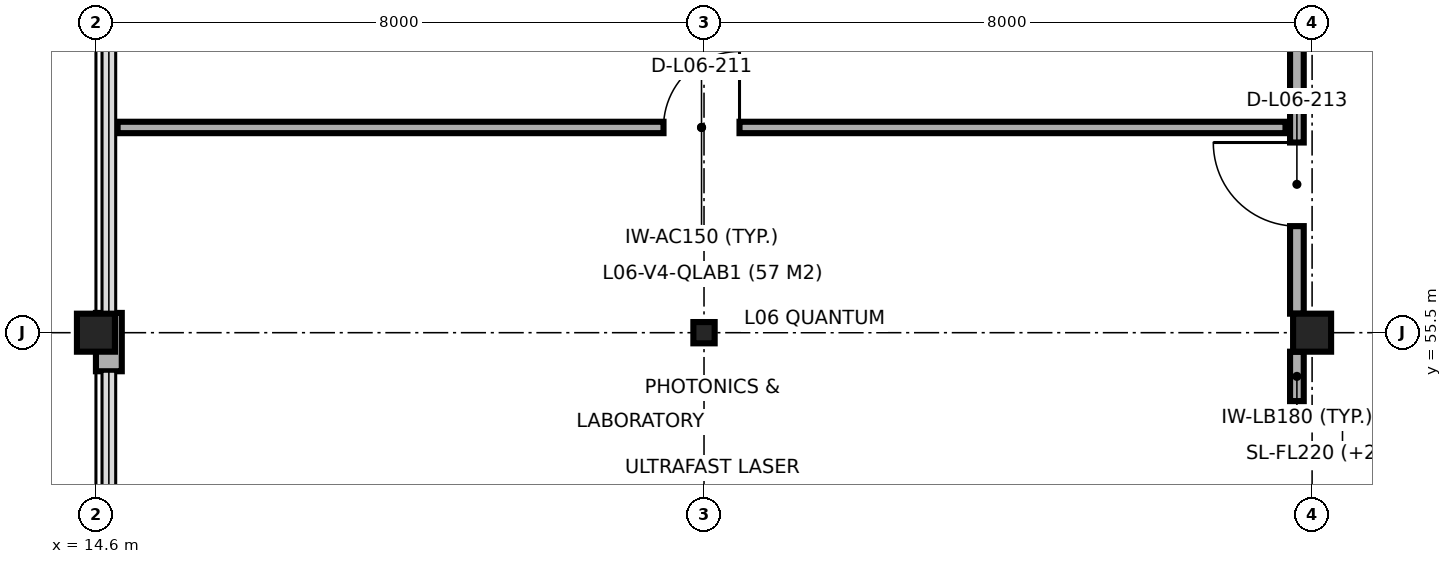
"""IFC4 building model, lengths in metres.
Left out: names, types, materials, properties, quantities, classifications, styles, units other than length and angle.
Written with IfcOpenShell. Run it as: python <this file> out.ifc"""

import sys

from ifc_helpers import new_model, si_unit, direction, frame, frame_2d, origin, origin_2d, place, context, subcontext, project, spatial, rectangle, i_section, extrude, element, fill, save


model = new_model("IFC4")
c1 = context("Model", 3, precision=1e-05, world=origin(), true_north=direction((0.0, 1.0)))
c2 = subcontext(c1, "Body", "Model", "MODEL_VIEW")
j1 = project(units=[si_unit("LENGTHUNIT", "METRE"), si_unit("PLANEANGLEUNIT", "RADIAN")], contexts=[c1])
p1 = place(None, origin())
s1 = spatial("IfcSite", under=j1, at=p1, CompositionType="ELEMENT")
p2 = place(p1, origin())
s2 = spatial("IfcBuilding", under=s1, at=p2, CompositionType="ELEMENT")
p3 = place(p2, frame((0.0, 0.0, 26.7)))
s3 = spatial("IfcBuildingStorey", under=s2, at=p3, CompositionType="ELEMENT", Elevation=26.7)
p4 = place(p3, frame((14.6, 55.5, 0.0), z_axis=(0.0, 0.0, 1.0), x_axis=(1.0, 0.0, 0.0)))
e1 = element("IfcColumn", 1, at=p4, inside=s3, PredefinedType="COLUMN", context=c2, shape_type="SweptSolid", body=[
    extrude(rectangle(XDim=0.5, YDim=0.5, at=origin_2d()), origin(), (0.0, 0.0, 1.0), 3.9),
])
p5 = place(p3, frame((22.6, 55.5, 0.0), z_axis=(0.0, 0.0, 1.0), x_axis=(1.0, 0.0, 0.0)))
e2 = element("IfcColumn", 2, at=p5, inside=s3, PredefinedType="COLUMN", context=c2, shape_type="SweptSolid", body=[
    extrude(i_section(OverallWidth=0.28, OverallDepth=0.28, WebThickness=0.01, FlangeThickness=0.018, FilletRadius=0.024, at=origin_2d()), origin(), (0.0, 0.0, 1.0), 3.9),
])
p6 = place(p3, frame((30.6, 55.5, 0.0), z_axis=(0.0, 0.0, 1.0), x_axis=(1.0, 0.0, 0.0)))
e3 = element("IfcColumn", 3, at=p6, inside=s3, PredefinedType="COLUMN", context=c2, shape_type="SweptSolid", body=[
    extrude(rectangle(XDim=0.5, YDim=0.5, at=origin_2d()), origin(), (0.0, 0.0, 1.0), 3.9),
])
p7 = place(p3, frame((14.77, 55.76, 0.0), z_axis=(0.0, 0.0, 1.0), x_axis=(0.0, -1.0, 0.0)))
e4 = element("IfcWall", 4, at=p7, inside=s3, PredefinedType="SOLIDWALL", context=c2, shape_type="SweptSolid", body=[
    extrude(rectangle(XDim=0.767, YDim=0.34, at=frame_2d((0.384, 0.0))), origin(), (0.0, 0.0, 1.0), 3.68),
])
p8 = place(p3, frame((14.885, 58.2, 0.0), z_axis=(0.0, 0.0, 1.0), x_axis=(1.0, 0.0, 0.0)))
e5 = element("IfcWall", 5, at=p8, inside=s3, PredefinedType="PARTITIONING", context=c2, shape_type="SweptSolid", body=[
    extrude(rectangle(XDim=15.365, YDim=0.15, at=frame_2d((7.683, 0.0))), origin(), (0.0, 0.0, 1.0), 3.68),
])
p9 = place(p8, frame((7.182, 0.0, 0.0)))
e6 = element("IfcOpeningElement", 6, at=p9, cuts=e5, PredefinedType="OPENING", context=c2, shape_type="SweptSolid", body=[
    extrude(rectangle(XDim=1.0, YDim=2.15, at=frame_2d((0.5, 1.075))), frame((0.0, 0.085, 0.0), z_axis=(0.0, -1.0, 0.0), x_axis=(1.0, 0.0, 0.0)), (0.0, 0.0, 1.0), 0.17),
])
p10 = place(p3, frame((30.4, 54.6, 0.0), z_axis=(0.0, 0.0, 1.0), x_axis=(0.0, 1.0, 0.0)))
e7 = element("IfcWall", 7, at=p10, inside=s3, PredefinedType="PARTITIONING", context=c2, shape_type="SweptSolid", body=[
    extrude(rectangle(XDim=0.65, YDim=0.18, at=frame_2d((0.325, 0.0))), origin(), (0.0, 0.0, 1.0), 3.28),
])
p11 = place(p3, frame((30.4, 55.75, 0.0), z_axis=(0.0, 0.0, 1.0), x_axis=(0.0, 1.0, 0.0)))
e8 = element("IfcWall", 8, at=p11, inside=s3, PredefinedType="PARTITIONING", context=c2, shape_type="SweptSolid", body=[
    extrude(rectangle(XDim=7.5, YDim=0.18, at=frame_2d((3.75, 0.0))), origin(), (0.0, 0.0, 1.0), 3.28),
])
p12 = place(p11, frame((1.152, 0.0, 0.0)))
e9 = element("IfcOpeningElement", 9, at=p12, cuts=e8, PredefinedType="OPENING", context=c2, shape_type="SweptSolid", body=[
    extrude(rectangle(XDim=1.1, YDim=2.15, at=frame_2d((0.55, 1.075))), frame((0.0, 0.1, 0.0), z_axis=(0.0, -1.0, 0.0), x_axis=(1.0, 0.0, 0.0)), (0.0, 0.0, 1.0), 0.2),
])
p13 = place(p9, origin())
e10 = element("IfcDoor", 10, at=p13, inside=s3, OperationType="SINGLE_SWING_RIGHT", PredefinedType="DOOR", context=c2, shape_type="SweptSolid", body=[
    extrude(rectangle(XDim=1.0, YDim=2.15, at=frame_2d((0.5, 1.075))), frame((0.0, 0.025, 0.0), z_axis=(0.0, -1.0, 0.0), x_axis=(1.0, 0.0, 0.0)), (0.0, 0.0, 1.0), 0.05),
])
fill(e6, e10)
p14 = place(p12, origin())
e11 = element("IfcDoor", 11, at=p14, inside=s3, OperationType="SINGLE_SWING_RIGHT", PredefinedType="DOOR", context=c2, shape_type="SweptSolid", body=[
    extrude(rectangle(XDim=1.1, YDim=2.15, at=frame_2d((0.55, 1.075))), frame((0.0, 0.025, 0.0), z_axis=(0.0, -1.0, 0.0), x_axis=(1.0, 0.0, 0.0)), (0.0, 0.0, 1.0), 0.05),
])
fill(e9, e11)
save(model, sys.argv[1])
